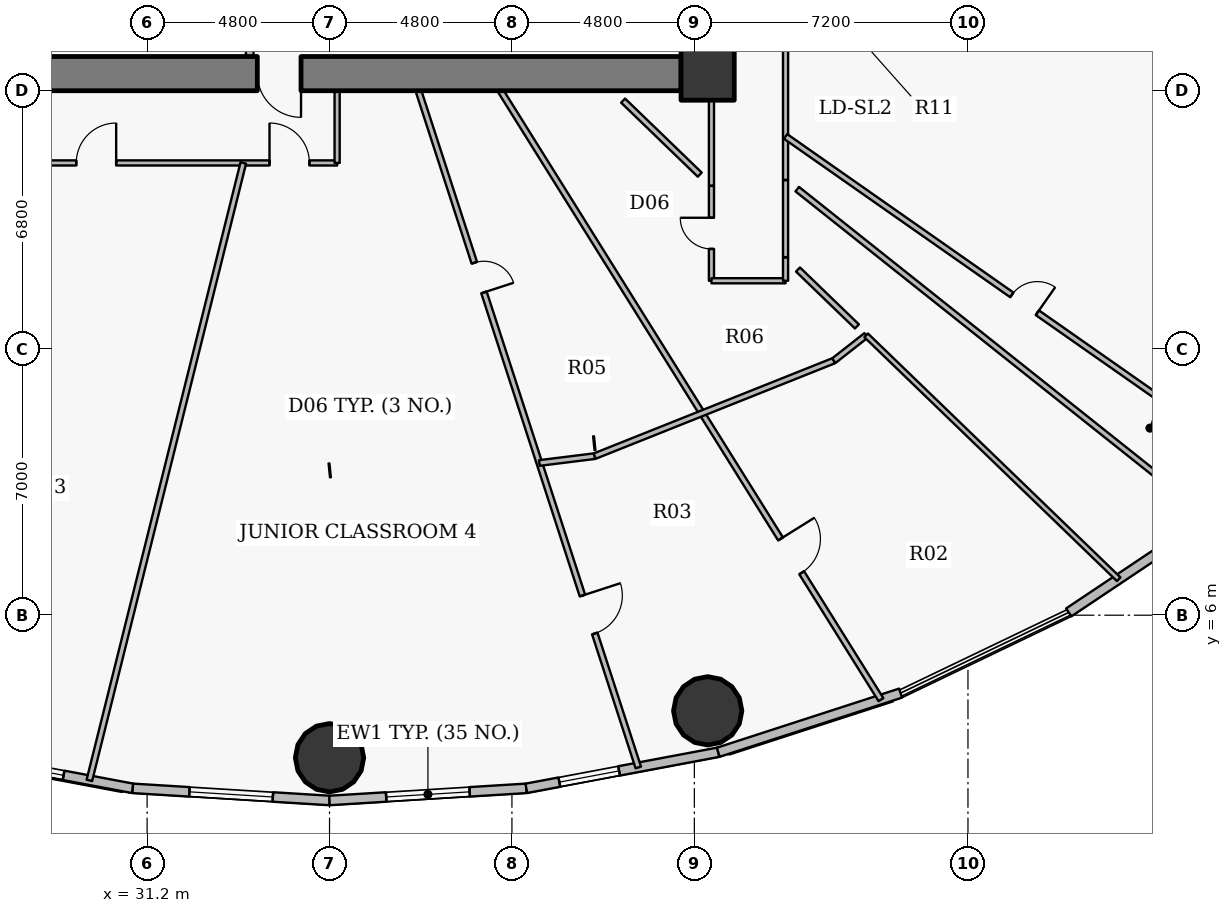
"""IFC4 building model, lengths in metres.
Left out: names, types, materials, properties, quantities, classifications, styles, units other than length and angle.
Written with IfcOpenShell. Run it as: python <this file> out.ifc"""

import sys

from ifc_helpers import new_model, si_unit, direction, frame, frame_2d, origin, origin_2d, place, context, subcontext, project, spatial, rectangle, hollow_circle, extrude, source, transform, mapped, element, fill, save


model = new_model("IFC4")
c1 = context("Model", 3, precision=1e-05, world=origin(), true_north=direction((0.0, 1.0)))
c2 = subcontext(c1, "Body", "Model", "MODEL_VIEW")
j1 = project(units=[si_unit("LENGTHUNIT", "METRE"), si_unit("PLANEANGLEUNIT", "RADIAN")], contexts=[c1])
p1 = place(None, origin())
s1 = spatial("IfcSite", under=j1, at=p1, CompositionType="ELEMENT")
p2 = place(p1, origin())
s2 = spatial("IfcBuilding", under=s1, at=p2, CompositionType="ELEMENT")
p3 = place(p2, frame((0.0, 0.0, 10.2)))
s3 = spatial("IfcBuildingStorey", under=s2, at=p3, CompositionType="ELEMENT", Elevation=10.2)
p4 = place(p3, frame((45.95, 20.25, 0.0), z_axis=(0.0, 0.0, 1.0), x_axis=(1.0, 0.0, 0.0)))
e1 = element("IfcColumn", 1, at=p4, inside=s3, PredefinedType="COLUMN", context=c2, shape_type="SweptSolid", body=[
    extrude(rectangle(XDim=1.4, YDim=1.4, at=origin_2d()), origin(), (0.0, 0.0, 1.0), 4.2),
])
p5 = place(p3, frame((45.25, 20.25, 0.0), z_axis=(0.0, 0.0, 1.0), x_axis=(-1.0, 0.0, 0.0)))
e2 = element("IfcWall", 2, at=p5, inside=s3, PredefinedType="SHEAR", context=c2, shape_type="SweptSolid", body=[
    extrude(rectangle(XDim=18.5, YDim=0.9, at=frame_2d((9.25, 0.0))), origin(), (0.0, 0.0, 1.0), 3.35),
])
p6 = place(p5, frame((10.0, 0.0, 0.0)))
e3 = element("IfcOpeningElement", 3, at=p6, cuts=e2, PredefinedType="OPENING", context=c2, shape_type="SweptSolid", body=[
    extrude(rectangle(XDim=1.15, YDim=2.15, at=origin_2d()), frame((0.575, 0.46, 1.075), z_axis=(0.0, -1.0, 0.0), x_axis=(1.0, 0.0, 0.0)), (0.0, 0.0, 1.0), 0.92),
])
for number, where, z_axis, x_axis in (
    (4, (36.0, 2.25, 0.0), (0.0, 0.0, 1.0), (1.0, 0.0, 0.0)),
    (5, (45.951, 3.484, 0.0), (0.0, 0.0, 1.0), (1.0, 0.0, 0.0)),
):
    element("IfcColumn", number, at=place(p3, frame(where, z_axis=z_axis, x_axis=x_axis)), inside=s3, PredefinedType="COLUMN", context=c2, shape_type="SweptSolid", body=[
        extrude(hollow_circle(Radius=0.9, WallThickness=0.05, at=origin_2d()), origin(), (0.0, 0.0, 1.0), 4.2),
    ])
p7 = place(p3, frame((30.822, 1.444, 0.0), z_axis=(0.0, 0.0, 1.0), x_axis=(-0.98278278947, 0.184764684726, 0.0)))
e6 = element("IfcWall", 6, at=p7, inside=s3, PredefinedType="SOLIDWALL", context=c2, shape_type="SweptSolid", body=[
    extrude(rectangle(XDim=5.139, YDim=0.25, at=frame_2d((2.569, 0.0))), origin(), (0.0, 0.0, 1.0), 3.9),
])
p8 = place(p7, frame((1.852, 0.0, 0.9)))
e7 = element("IfcOpeningElement", 7, at=p8, cuts=e6, PredefinedType="OPENING", context=c2, shape_type="SweptSolid", body=[
    extrude(rectangle(XDim=2.2, YDim=2.0, at=origin_2d()), frame((1.1, 0.135, 1.0), z_axis=(0.0, -1.0, 0.0), x_axis=(1.0, 0.0, 0.0)), (0.0, 0.0, 1.0), 0.27),
])
p9 = place(p3, frame((36.0, 1.125, 0.0), z_axis=(0.0, 0.0, 1.0), x_axis=(-0.998106762298, 0.061505211614, 0.0)))
e8 = element("IfcWall", 8, at=p9, inside=s3, PredefinedType="SOLIDWALL", context=c2, shape_type="SweptSolid", body=[
    extrude(rectangle(XDim=5.188, YDim=0.25, at=frame_2d((2.594, 0.0))), origin(), (0.0, 0.0, 1.0), 3.9),
])
p10 = place(p9, frame((1.494, 0.0, 0.9)))
e9 = element("IfcOpeningElement", 9, at=p10, cuts=e8, PredefinedType="OPENING", context=c2, shape_type="SweptSolid", body=[
    extrude(rectangle(XDim=2.2, YDim=2.0, at=origin_2d()), frame((1.1, 0.135, 1.0), z_axis=(0.0, -1.0, 0.0), x_axis=(1.0, 0.0, 0.0)), (0.0, 0.0, 1.0), 0.27),
])
p11 = place(p3, frame((41.178, 1.444, 0.0), z_axis=(0.0, 0.0, 1.0), x_axis=(-0.998106762298, -0.061505211614, 0.0)))
e10 = element("IfcWall", 10, at=p11, inside=s3, PredefinedType="SOLIDWALL", context=c2, shape_type="SweptSolid", body=[
    extrude(rectangle(XDim=5.188, YDim=0.25, at=frame_2d((2.594, 0.0))), origin(), (0.0, 0.0, 1.0), 3.9),
])
p12 = place(p11, frame((1.494, 0.0, 0.9)))
e11 = element("IfcOpeningElement", 11, at=p12, cuts=e10, PredefinedType="OPENING", context=c2, shape_type="SweptSolid", body=[
    extrude(rectangle(XDim=2.2, YDim=2.0, at=origin_2d()), frame((1.1, 0.135, 1.0), z_axis=(0.0, -1.0, 0.0), x_axis=(1.0, 0.0, 0.0)), (0.0, 0.0, 1.0), 0.27),
])
p13 = place(p3, frame((46.229, 2.394, 0.0), z_axis=(0.0, 0.0, 1.0), x_axis=(-0.98278278947, -0.184764684726, 0.0)))
e12 = element("IfcWall", 12, at=p13, inside=s3, PredefinedType="SOLIDWALL", context=c2, shape_type="SweptSolid", body=[
    extrude(rectangle(XDim=5.139, YDim=0.25, at=frame_2d((2.569, 0.0))), origin(), (0.0, 0.0, 1.0), 3.9),
])
p14 = place(p13, frame((2.654, 0.0, 0.9)))
e13 = element("IfcOpeningElement", 13, at=p14, cuts=e12, PredefinedType="OPENING", context=c2, shape_type="SweptSolid", body=[
    extrude(rectangle(XDim=1.6, YDim=1.75, at=origin_2d()), frame((0.8, 0.135, 0.875), z_axis=(0.0, -1.0, 0.0), x_axis=(1.0, 0.0, 0.0)), (0.0, 0.0, 1.0), 0.27),
])
p15 = place(p3, frame((51.026, 3.95, 0.0), z_axis=(0.0, 0.0, 1.0), x_axis=(-0.951198629726, -0.308579271513, 0.0)))
e14 = element("IfcWall", 14, at=p15, inside=s3, PredefinedType="SOLIDWALL", context=c2, shape_type="SweptSolid", body=[
    extrude(rectangle(XDim=5.044, YDim=0.25, at=frame_2d((2.522, 0.0))), origin(), (0.0, 0.0, 1.0), 3.9),
])
p16 = place(p3, frame((59.399, 8.714, 0.0), z_axis=(0.0, 0.0, 1.0), x_axis=(-0.831218664812, -0.555945618985, 0.0)))
e15 = element("IfcWall", 15, at=p16, inside=s3, PredefinedType="SOLIDWALL", context=c2, shape_type="SweptSolid", body=[
    extrude(rectangle(XDim=4.748, YDim=0.25, at=frame_2d((2.374, 0.0))), origin(), (0.0, 0.0, 1.0), 3.9),
])
p17 = place(p3, frame((25.95, 17.9, 0.0), z_axis=(0.0, 0.0, 1.0), x_axis=(1.0, 0.0, 0.0)))
e16 = element("IfcWall", 16, at=p17, inside=s3, PredefinedType="PARTITIONING", context=c2, shape_type="SweptSolid", body=[
    extrude(rectangle(XDim=10.25, YDim=0.135, at=frame_2d((5.125, 0.0))), origin(), (0.0, 0.0, 1.0), 3.085),
])
p18 = place(p17, frame((3.385, 0.0, 0.0)))
e17 = element("IfcOpeningElement", 17, at=p18, cuts=e16, PredefinedType="OPENING", context=c2, shape_type="SweptSolid", body=[
    extrude(rectangle(XDim=1.05, YDim=2.15, at=origin_2d()), frame((0.525, 0.078, 1.075), z_axis=(0.0, -1.0, 0.0), x_axis=(1.0, 0.0, 0.0)), (0.0, 0.0, 1.0), 0.155),
])
p19 = place(p17, frame((8.471, 0.0, 0.0)))
e18 = element("IfcOpeningElement", 18, at=p19, cuts=e16, PredefinedType="OPENING", context=c2, shape_type="SweptSolid", body=[
    extrude(rectangle(XDim=1.05, YDim=2.15, at=origin_2d()), frame((0.525, 0.078, 1.075), z_axis=(0.0, -1.0, 0.0), x_axis=(1.0, 0.0, 0.0)), (0.0, 0.0, 1.0), 0.155),
])
p20 = place(p3, frame((29.68, 1.654, 0.0), z_axis=(0.0, 0.0, 1.0), x_axis=(0.241928320832, 0.970294124263, 0.0)))
e19 = element("IfcWall", 19, at=p20, inside=s3, PredefinedType="PARTITIONING", context=c2, shape_type="SweptSolid", body=[
    extrude(rectangle(XDim=16.744, YDim=0.15, at=frame_2d((8.372, 0.0))), origin(), (0.0, 0.0, 1.0), 3.285),
])
p21 = place(p3, frame((33.9, 20.7, 0.0), z_axis=(0.0, 0.0, 1.0), x_axis=(0.0, 1.0, 0.0)))
e20 = element("IfcWall", 20, at=p21, inside=s3, PredefinedType="PARTITIONING", context=c2, shape_type="SweptSolid", body=[
    extrude(rectangle(XDim=11.4, YDim=0.2, at=frame_2d((5.7, 0.0))), origin(), (0.0, 0.0, 1.0), 3.485),
])
p22 = place(p3, frame((36.2, 17.9, 0.0), z_axis=(0.0, 0.0, 1.0), x_axis=(0.0, 1.0, 0.0)))
e21 = element("IfcWall", 21, at=p22, inside=s3, PredefinedType="PARTITIONING", context=c2, shape_type="SweptSolid", body=[
    extrude(rectangle(XDim=1.9, YDim=0.135, at=frame_2d((0.95, 0.0))), origin(), (0.0, 0.0, 1.0), 3.085),
])
p23 = place(p3, frame((38.339, 19.8, 0.0), z_axis=(0.0, 0.0, 1.0), x_axis=(0.309020911431, -0.951055243557, 0.0)))
e22 = element("IfcWall", 22, at=p23, inside=s3, PredefinedType="PARTITIONING", context=c2, shape_type="SweptSolid", body=[
    extrude(rectangle(XDim=18.723, YDim=0.15, at=frame_2d((9.362, 0.0))), origin(), (0.0, 0.0, 1.0), 3.285),
])
p24 = place(p23, frame((4.76, 0.0, 0.0)))
e23 = element("IfcOpeningElement", 23, at=p24, cuts=e22, PredefinedType="OPENING", context=c2, shape_type="SweptSolid", body=[
    extrude(rectangle(XDim=0.82, YDim=2.1, at=origin_2d()), frame((0.41, 0.085, 1.05), z_axis=(0.0, -1.0, 0.0), x_axis=(1.0, 0.0, 0.0)), (0.0, 0.0, 1.0), 0.17),
])
p25 = place(p23, frame((13.966, 0.0, 0.0)))
e24 = element("IfcOpeningElement", 24, at=p25, cuts=e22, PredefinedType="OPENING", context=c2, shape_type="SweptSolid", body=[
    extrude(rectangle(XDim=1.05, YDim=2.15, at=origin_2d()), frame((0.525, 0.085, 1.075), z_axis=(0.0, -1.0, 0.0), x_axis=(1.0, 0.0, 0.0)), (0.0, 0.0, 1.0), 0.17),
])
p26 = place(p3, frame((40.499, 19.8, 0.0), z_axis=(0.0, 0.0, 1.0), x_axis=(0.529919953547, -0.848047665425, 0.0)))
e25 = element("IfcWall", 25, at=p26, inside=s3, PredefinedType="PARTITIONING", context=c2, shape_type="SweptSolid", body=[
    extrude(rectangle(XDim=18.893, YDim=0.15, at=frame_2d((9.447, 0.0))), origin(), (0.0, 0.0, 1.0), 3.285),
])
p27 = place(p26, frame((13.906, 0.0, 0.0)))
e26 = element("IfcOpeningElement", 26, at=p27, cuts=e25, PredefinedType="OPENING", context=c2, shape_type="SweptSolid", body=[
    extrude(rectangle(XDim=1.05, YDim=2.15, at=origin_2d()), frame((0.525, 0.085, 1.075), z_axis=(0.0, -1.0, 0.0), x_axis=(1.0, 0.0, 0.0)), (0.0, 0.0, 1.0), 0.17),
])
p28 = place(p3, frame((41.522, 10.005, 0.0), z_axis=(0.0, 0.0, 1.0), x_axis=(0.992392781159, 0.123112013644, 0.0)))
e27 = element("IfcWall", 27, at=p28, inside=s3, PredefinedType="PARTITIONING", context=c2, shape_type="SweptSolid", body=[
    extrude(rectangle(XDim=1.466, YDim=0.15, at=frame_2d((0.733, 0.0))), origin(), (0.0, 0.0, 1.0), 3.085),
])
p29 = place(p3, frame((42.976, 10.185, 0.0), z_axis=(0.0, 0.0, 1.0), x_axis=(0.928789451967, 0.370607816857, 0.0)))
e28 = element("IfcWall", 28, at=p29, inside=s3, PredefinedType="PARTITIONING", context=c2, shape_type="SweptSolid", body=[
    extrude(rectangle(XDim=6.776, YDim=0.15, at=frame_2d((3.388, 0.0))), origin(), (0.0, 0.0, 1.0), 3.085),
])
p30 = place(p3, frame((46.05, 14.8, 0.0), z_axis=(0.0, 0.0, 1.0), x_axis=(0.0, 1.0, 0.0)))
e29 = element("IfcWall", 29, at=p30, inside=s3, PredefinedType="PARTITIONING", context=c2, shape_type="SweptSolid", body=[
    extrude(rectangle(XDim=2.495, YDim=0.135, at=frame_2d((1.248, 0.0))), origin(), (0.0, 0.0, 1.0), 3.9),
])
p31 = place(p30, frame((0.837, 0.0, 0.0)))
e30 = element("IfcOpeningElement", 30, at=p31, cuts=e29, PredefinedType="OPENING", context=c2, shape_type="SweptSolid", body=[
    extrude(rectangle(XDim=0.82, YDim=2.1, at=origin_2d()), frame((0.41, 0.078, 1.05), z_axis=(0.0, -1.0, 0.0), x_axis=(1.0, 0.0, 0.0)), (0.0, 0.0, 1.0), 0.155),
])
p32 = place(p3, frame((46.05, 14.8, 0.0), z_axis=(0.0, 0.0, 1.0), x_axis=(1.0, 0.0, 0.0)))
e31 = element("IfcWall", 31, at=p32, inside=s3, PredefinedType="PARTITIONING", context=c2, shape_type="SweptSolid", body=[
    extrude(rectangle(XDim=1.95, YDim=0.135, at=frame_2d((0.975, 0.0))), origin(), (0.0, 0.0, 1.0), 3.9),
])
p33 = place(p3, frame((48.0, 14.8, 0.0), z_axis=(0.0, 0.0, 1.0), x_axis=(0.0, 1.0, 0.0)))
e32 = element("IfcWall", 32, at=p33, inside=s3, PredefinedType="PARTITIONING", context=c2, shape_type="SweptSolid", body=[
    extrude(rectangle(XDim=0.612, YDim=0.135, at=frame_2d((0.306, 0.0))), origin(), (0.0, 0.0, 1.0), 3.9),
])
p34 = place(p3, frame((48.0, 17.455, 0.0), z_axis=(0.0, 0.0, 1.0), x_axis=(0.0, 1.0, 0.0)))
e33 = element("IfcWall", 33, at=p34, inside=s3, PredefinedType="PARTITIONING", context=c2, shape_type="SweptSolid", body=[
    extrude(rectangle(XDim=3.545, YDim=0.135, at=frame_2d((1.772, 0.0))), origin(), (0.0, 0.0, 1.0), 3.085),
])
p35 = place(p3, frame((48.0, 18.597, 0.0), z_axis=(0.0, 0.0, 1.0), x_axis=(0.819153488973, -0.573574373123, 0.0)))
e34 = element("IfcWall", 34, at=p35, inside=s3, PredefinedType="PARTITIONING", context=c2, shape_type="SweptSolid", body=[
    extrude(rectangle(XDim=15.356, YDim=0.15, at=frame_2d((7.678, 0.0))), origin(), (0.0, 0.0, 1.0), 3.285),
])
p36 = place(p35, frame((7.268, 0.0, 0.0)))
e35 = element("IfcOpeningElement", 35, at=p36, cuts=e34, PredefinedType="OPENING", context=c2, shape_type="SweptSolid", body=[
    extrude(rectangle(XDim=0.82, YDim=2.1, at=origin_2d()), frame((0.41, 0.085, 1.05), z_axis=(0.0, -1.0, 0.0), x_axis=(1.0, 0.0, 0.0)), (0.0, 0.0, 1.0), 0.17),
])
p37 = place(p3, frame((49.27, 12.697, 0.0), z_axis=(0.0, 0.0, 1.0), x_axis=(0.787281025789, 0.616594345119, 0.0)))
e36 = element("IfcWall", 36, at=p37, inside=s3, PredefinedType="PARTITIONING", context=c2, shape_type="SweptSolid", body=[
    extrude(rectangle(XDim=1.081, YDim=0.15, at=frame_2d((0.541, 0.0))), origin(), (0.0, 0.0, 1.0), 3.9),
])
p38 = place(p3, frame((48.0, 17.445, 0.0), z_axis=(0.0, 0.0, 1.0), x_axis=(0.0, -1.0, 0.0)))
e37 = element("IfcWall", 37, at=p38, inside=s3, PredefinedType="PARTITIONING", context=c2, shape_type="SweptSolid", body=[
    extrude(rectangle(XDim=2.023, YDim=0.135, at=frame_2d((1.012, 0.0))), origin(), (0.0, 0.0, 1.0), 3.9),
])
p39 = place(p3, frame((46.05, 17.305, 0.0), z_axis=(0.0, 0.0, 1.0), x_axis=(0.0, 1.0, 0.0)))
e38 = element("IfcWall", 38, at=p39, inside=s3, PredefinedType="PARTITIONING", context=c2, shape_type="SweptSolid", body=[
    extrude(rectangle(XDim=2.495, YDim=0.135, at=frame_2d((1.248, 0.0))), origin(), (0.0, 0.0, 1.0), 3.085),
])
p40 = place(p3, frame((46.4, 19.8, 0.0), z_axis=(0.0, 0.0, 1.0), x_axis=(0.0, 1.0, 0.0)))
e39 = element("IfcWall", 39, at=p40, inside=s3, PredefinedType="PARTITIONING", context=c2, shape_type="SweptSolid", body=[
    extrude(rectangle(XDim=1.14, YDim=0.135, at=frame_2d((0.57, 0.0))), origin(), (0.0, 0.0, 1.0), 3.9),
])
p41 = place(p3, frame((43.725, 19.54, 0.0), z_axis=(0.0, 0.0, 1.0), x_axis=(0.719317456081, -0.69468150787, 0.0)))
e40 = element("IfcWall", 40, at=p41, inside=s3, PredefinedType="PARTITIONING", context=c2, shape_type="SweptSolid", body=[
    extrude(rectangle(XDim=2.804, YDim=0.15, at=frame_2d((1.402, 0.0))), origin(), (0.0, 0.0, 1.0), 3.9),
])
p42 = place(p3, frame((48.327, 15.095, 0.0), z_axis=(0.0, 0.0, 1.0), x_axis=(0.719401460617, -0.6945945137, 0.0)))
e41 = element("IfcWall", 41, at=p42, inside=s3, PredefinedType="PARTITIONING", context=c2, shape_type="SweptSolid", body=[
    extrude(rectangle(XDim=2.155, YDim=0.15, at=frame_2d((1.078, 0.0))), origin(), (0.0, 0.0, 1.0), 3.9),
])
p43 = place(p3, frame((50.121, 13.363, 0.0), z_axis=(0.0, 0.0, 1.0), x_axis=(0.719341799646, -0.69465630011, 0.0)))
e42 = element("IfcWall", 42, at=p43, inside=s3, PredefinedType="PARTITIONING", context=c2, shape_type="SweptSolid", body=[
    extrude(rectangle(XDim=9.237, YDim=0.135, at=frame_2d((4.619, 0.0))), origin(), (0.0, 0.0, 1.0), 3.285),
])
p44 = place(p3, frame((59.18, 8.562, 0.0), z_axis=(0.0, 0.0, 1.0), x_axis=(-0.782605918506, 0.622517450614, 0.0)))
e43 = element("IfcWall", 43, at=p44, inside=s3, PredefinedType="PARTITIONING", context=c2, shape_type="SweptSolid", body=[
    extrude(rectangle(XDim=13.893, YDim=0.15, at=frame_2d((6.947, 0.0))), origin(), (0.0, 0.0, 1.0), 3.285),
])
m1 = source(origin(), c2, "Body", "SweptSolid", [
    extrude(rectangle(XDim=2.2, YDim=2.0, at=origin_2d()), frame((1.1, 0.03, 1.0), z_axis=(0.0, -1.0, 0.0), x_axis=(1.0, 0.0, 0.0)), (0.0, 0.0, 1.0), 0.06),
])
p45 = place(p8, origin())
e44 = element("IfcWindow", 44, at=p45, inside=s3, PartitioningType="TRIPLE_PANEL_VERTICAL", PredefinedType="WINDOW", context=c2, shape_type="MappedRepresentation", body=[
    mapped(m1, transform((0.0, 0.0, 0.0), x_axis=(1.0, 0.0, 0.0), y_axis=(0.0, 1.0, 0.0), z_axis=(0.0, 0.0, 1.0), scale=1.0)),
])
fill(e7, e44)
p46 = place(p10, origin())
e45 = element("IfcWindow", 45, at=p46, inside=s3, PartitioningType="TRIPLE_PANEL_VERTICAL", PredefinedType="WINDOW", context=c2, shape_type="MappedRepresentation", body=[
    mapped(m1, transform((0.0, 0.0, 0.0), x_axis=(1.0, 0.0, 0.0), y_axis=(0.0, 1.0, 0.0), z_axis=(0.0, 0.0, 1.0), scale=1.0)),
])
fill(e9, e45)
p47 = place(p12, origin())
e46 = element("IfcWindow", 46, at=p47, inside=s3, PartitioningType="TRIPLE_PANEL_VERTICAL", PredefinedType="WINDOW", context=c2, shape_type="MappedRepresentation", body=[
    mapped(m1, transform((0.0, 0.0, 0.0), x_axis=(1.0, 0.0, 0.0), y_axis=(0.0, 1.0, 0.0), z_axis=(0.0, 0.0, 1.0), scale=1.0)),
])
fill(e11, e46)
m2 = source(origin(), c2, "Body", "SweptSolid", [
    extrude(rectangle(XDim=1.6, YDim=1.75, at=origin_2d()), frame((0.8, 0.03, 0.875), z_axis=(0.0, -1.0, 0.0), x_axis=(1.0, 0.0, 0.0)), (0.0, 0.0, 1.0), 0.06),
])
p48 = place(p14, origin())
e47 = element("IfcWindow", 47, at=p48, inside=s3, PartitioningType="DOUBLE_PANEL_VERTICAL", PredefinedType="WINDOW", context=c2, shape_type="MappedRepresentation", body=[
    mapped(m2, transform((0.0, 0.0, 0.0), x_axis=(1.0, 0.0, 0.0), y_axis=(0.0, 1.0, 0.0), z_axis=(0.0, 0.0, 1.0), scale=1.0)),
])
fill(e13, e47)
m3 = source(origin(), c2, "Body", "SweptSolid", [
    extrude(rectangle(XDim=1.15, YDim=2.15, at=origin_2d()), frame((0.575, 0.025, 1.075), z_axis=(0.0, -1.0, 0.0), x_axis=(1.0, 0.0, 0.0)), (0.0, 0.0, 1.0), 0.05),
])
p49 = place(p6, origin())
e48 = element("IfcDoor", 48, at=p49, inside=s3, OperationType="SINGLE_SWING_LEFT", PredefinedType="DOOR", context=c2, shape_type="MappedRepresentation", body=[
    mapped(m3, transform((0.0, 0.0, 0.0), x_axis=(1.0, 0.0, 0.0), y_axis=(0.0, 1.0, 0.0), z_axis=(0.0, 0.0, 1.0), scale=1.0)),
])
fill(e3, e48)
m4 = source(origin(), c2, "Body", "SweptSolid", [
    extrude(rectangle(XDim=1.05, YDim=2.15, at=origin_2d()), frame((0.525, 0.025, 1.075), z_axis=(0.0, -1.0, 0.0), x_axis=(1.0, 0.0, 0.0)), (0.0, 0.0, 1.0), 0.05),
])
p50 = place(p18, origin())
e49 = element("IfcDoor", 49, at=p50, inside=s3, OperationType="SINGLE_SWING_RIGHT", PredefinedType="DOOR", context=c2, shape_type="MappedRepresentation", body=[
    mapped(m4, transform((0.0, 0.0, 0.0), x_axis=(1.0, 0.0, 0.0), y_axis=(0.0, 1.0, 0.0), z_axis=(0.0, 0.0, 1.0), scale=1.0)),
])
fill(e17, e49)
p51 = place(p19, origin())
e50 = element("IfcDoor", 50, at=p51, inside=s3, OperationType="SINGLE_SWING_LEFT", PredefinedType="DOOR", context=c2, shape_type="MappedRepresentation", body=[
    mapped(m4, transform((0.0, 0.0, 0.0), x_axis=(1.0, 0.0, 0.0), y_axis=(0.0, 1.0, 0.0), z_axis=(0.0, 0.0, 1.0), scale=1.0)),
])
fill(e18, e50)
m5 = source(origin(), c2, "Body", "SweptSolid", [
    extrude(rectangle(XDim=0.82, YDim=2.1, at=origin_2d()), frame((0.41, 0.025, 1.05), z_axis=(0.0, -1.0, 0.0), x_axis=(1.0, 0.0, 0.0)), (0.0, 0.0, 1.0), 0.05),
])
p52 = place(p24, origin())
e51 = element("IfcDoor", 51, at=p52, inside=s3, OperationType="SINGLE_SWING_RIGHT", PredefinedType="DOOR", context=c2, shape_type="MappedRepresentation", body=[
    mapped(m5, transform((0.0, 0.0, 0.0), x_axis=(1.0, 0.0, 0.0), y_axis=(0.0, 1.0, 0.0), z_axis=(0.0, 0.0, 1.0), scale=1.0)),
])
fill(e23, e51)
p53 = place(p25, origin())
e52 = element("IfcDoor", 52, at=p53, inside=s3, OperationType="SINGLE_SWING_LEFT", PredefinedType="DOOR", context=c2, shape_type="MappedRepresentation", body=[
    mapped(m4, transform((0.0, 0.0, 0.0), x_axis=(1.0, 0.0, 0.0), y_axis=(0.0, 1.0, 0.0), z_axis=(0.0, 0.0, 1.0), scale=1.0)),
])
fill(e24, e52)
p54 = place(p31, origin())
e53 = element("IfcDoor", 53, at=p54, inside=s3, OperationType="SINGLE_SWING_RIGHT", PredefinedType="DOOR", context=c2, shape_type="MappedRepresentation", body=[
    mapped(m5, transform((0.0, 0.0, 0.0), x_axis=(1.0, 0.0, 0.0), y_axis=(0.0, 1.0, 0.0), z_axis=(0.0, 0.0, 1.0), scale=1.0)),
])
fill(e30, e53)
p55 = place(p27, origin())
e54 = element("IfcDoor", 54, at=p55, inside=s3, OperationType="SINGLE_SWING_LEFT", PredefinedType="DOOR", context=c2, shape_type="MappedRepresentation", body=[
    mapped(m4, transform((0.0, 0.0, 0.0), x_axis=(1.0, 0.0, 0.0), y_axis=(0.0, 1.0, 0.0), z_axis=(0.0, 0.0, 1.0), scale=1.0)),
])
fill(e26, e54)
p56 = place(p36, origin())
e55 = element("IfcDoor", 55, at=p56, inside=s3, OperationType="SINGLE_SWING_RIGHT", PredefinedType="DOOR", context=c2, shape_type="MappedRepresentation", body=[
    mapped(m5, transform((0.0, 0.0, 0.0), x_axis=(1.0, 0.0, 0.0), y_axis=(0.0, 1.0, 0.0), z_axis=(0.0, 0.0, 1.0), scale=1.0)),
])
fill(e35, e55)
save(model, sys.argv[1])
